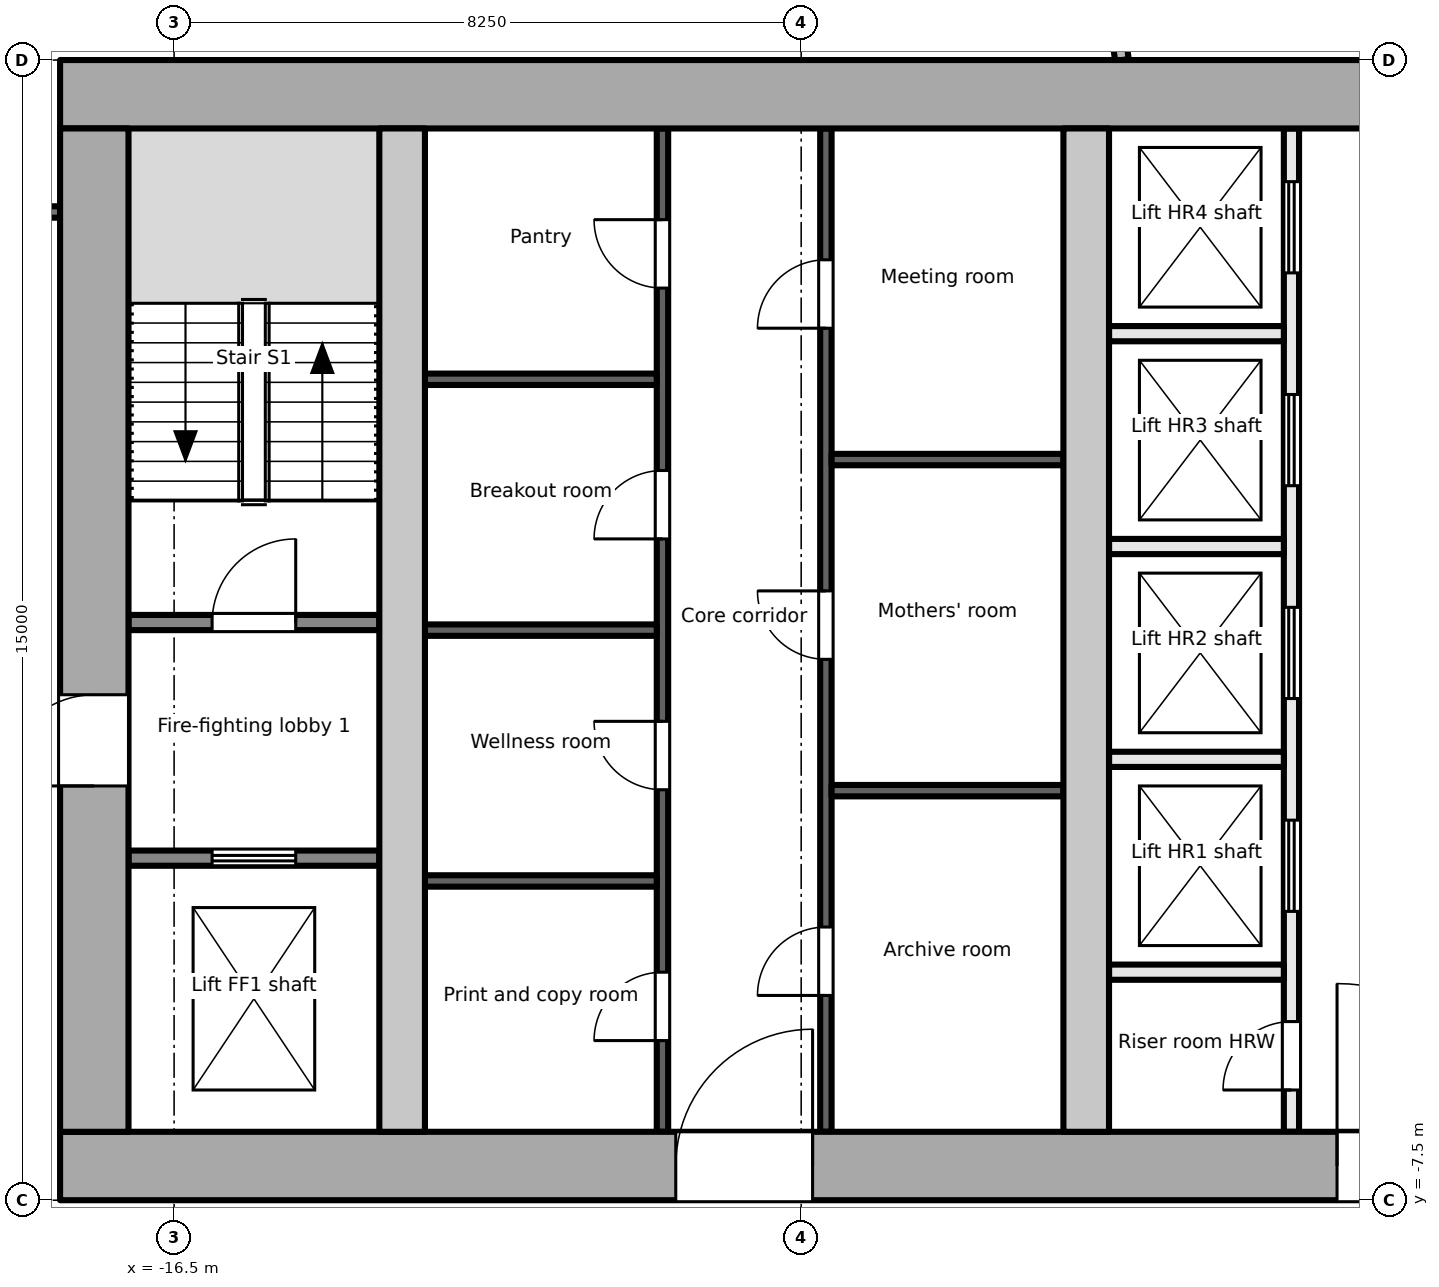
"""IFC4 building model, lengths in metres.
Left out: names, types, materials, properties, quantities, classifications, styles, units other than length and angle.
Written with IfcOpenShell. Run it as: python <this file> out.ifc"""

import sys

from ifc_helpers import new_model, si_unit, direction, frame, frame_2d, origin, place, context, subcontext, project, spatial, rectangle, extrude, element, fill, save


model = new_model("IFC4")
c1 = context("Model", 3, precision=1e-05, world=origin(), true_north=direction((0.0, 1.0)))
c2 = subcontext(c1, "Body", "Model", "MODEL_VIEW")
j1 = project(units=[si_unit("LENGTHUNIT", "METRE"), si_unit("PLANEANGLEUNIT", "RADIAN")], contexts=[c1])
p1 = place(None, origin())
s1 = spatial("IfcSite", under=j1, at=p1, CompositionType="ELEMENT")
p2 = place(p1, origin())
s2 = spatial("IfcBuilding", under=s1, at=p2, CompositionType="ELEMENT")
p3 = place(p2, frame((0.0, 0.0, 172.4)))
s3 = spatial("IfcBuildingStorey", under=s2, at=p3, CompositionType="ELEMENT", Elevation=172.4)
p4 = place(p3, frame((-18.0, -7.05, -0.2), z_axis=(0.0, 0.0, 1.0), x_axis=(1.0, 0.0, 0.0)))
e1 = element("IfcWall", 1, at=p4, inside=s3, PredefinedType="SHEAR", context=c2, shape_type="SweptSolid", body=[
    extrude(rectangle(XDim=36.0, YDim=0.9, at=frame_2d((18.0, 0.0))), origin(), (0.0, 0.0, 1.0), 3.9),
])
p5 = place(p4, frame((8.1, 0.0, 0.2)))
e2 = element("IfcOpeningElement", 2, at=p5, cuts=e1, PredefinedType="OPENING", context=c2, shape_type="SweptSolid", body=[
    extrude(rectangle(XDim=1.8, YDim=2.1, at=frame_2d((0.9, 1.05))), frame((0.0, 0.46, 0.0), z_axis=(0.0, -1.0, 0.0), x_axis=(1.0, 0.0, 0.0)), (0.0, 0.0, 1.0), 0.921),
])
p6 = place(p4, frame((16.8, 0.0, 0.2)))
e3 = element("IfcOpeningElement", 3, at=p6, cuts=e1, PredefinedType="OPENING", context=c2, shape_type="SweptSolid", body=[
    extrude(rectangle(XDim=2.4, YDim=2.1, at=frame_2d((1.2, 1.05))), frame((0.0, 0.46, 0.0), z_axis=(0.0, -1.0, 0.0), x_axis=(1.0, 0.0, 0.0)), (0.0, 0.0, 1.0), 0.921),
])
p7 = place(p4, frame((26.1, 0.0, 0.2)))
e4 = element("IfcOpeningElement", 4, at=p7, cuts=e1, PredefinedType="OPENING", context=c2, shape_type="SweptSolid", body=[
    extrude(rectangle(XDim=2.4, YDim=2.1, at=frame_2d((1.2, 1.05))), frame((0.0, 0.46, 0.0), z_axis=(0.0, -1.0, 0.0), x_axis=(1.0, 0.0, 0.0)), (0.0, 0.0, 1.0), 0.921),
])
p8 = place(p3, frame((-18.0, 7.05, -0.2), z_axis=(0.0, 0.0, 1.0), x_axis=(1.0, 0.0, 0.0)))
e5 = element("IfcWall", 5, at=p8, inside=s3, PredefinedType="SHEAR", context=c2, shape_type="SweptSolid", body=[
    extrude(rectangle(XDim=36.0, YDim=0.9, at=frame_2d((18.0, 0.0))), origin(), (0.0, 0.0, 1.0), 3.9),
])
p9 = place(p3, frame((-17.55, -6.6, -0.2), z_axis=(0.0, 0.0, 1.0), x_axis=(0.0, 1.0, 0.0)))
e6 = element("IfcWall", 6, at=p9, inside=s3, PredefinedType="SHEAR", context=c2, shape_type="SweptSolid", body=[
    extrude(rectangle(XDim=13.2, YDim=0.9, at=frame_2d((6.6, 0.0))), origin(), (0.0, 0.0, 1.0), 3.9),
])
p10 = place(p9, frame((4.55, 0.0, 0.2)))
e7 = element("IfcOpeningElement", 7, at=p10, cuts=e6, PredefinedType="OPENING", context=c2, shape_type="SweptSolid", body=[
    extrude(rectangle(XDim=1.2, YDim=2.1, at=frame_2d((0.6, 1.05))), frame((0.0, 0.46, 0.0), z_axis=(0.0, -1.0, 0.0), x_axis=(1.0, 0.0, 0.0)), (0.0, 0.0, 1.0), 0.921),
])
for number, where, z_axis, x_axis in (
    (8, (-13.5, -6.6, -0.2), (0.0, 0.0, 1.0), (0.0, 1.0, 0.0)),
    (9, (-4.5, -6.6, -0.2), (0.0, 0.0, 1.0), (0.0, 1.0, 0.0)),
):
    element("IfcWall", number, at=place(p3, frame(where, z_axis=z_axis, x_axis=x_axis)), inside=s3, PredefinedType="SHEAR", context=c2, shape_type="SweptSolid", body=[
        extrude(rectangle(XDim=13.2, YDim=0.6, at=frame_2d((6.6, 0.0))), origin(), (0.0, 0.0, 1.0), 3.9),
    ])
p11 = place(p3, frame((-17.1, -3.0, 0.0), z_axis=(0.0, 0.0, 1.0), x_axis=(1.0, 0.0, 0.0)))
e10 = element("IfcWall", 10, at=p11, inside=s3, PredefinedType="PARTITIONING", context=c2, shape_type="SweptSolid", body=[
    extrude(rectangle(XDim=3.3, YDim=0.2, at=frame_2d((1.65, 0.0))), origin(), (0.0, 0.0, 1.0), 3.7),
])
p12 = place(p11, frame((1.1, 0.0, 0.0)))
e11 = element("IfcOpeningElement", 11, at=p12, cuts=e10, PredefinedType="OPENING", context=c2, shape_type="SweptSolid", body=[
    extrude(rectangle(XDim=1.1, YDim=2.1, at=frame_2d((0.55, 1.05))), frame((0.0, 0.111, 0.0), z_axis=(0.0, -1.0, 0.0), x_axis=(1.0, 0.0, 0.0)), (0.0, 0.0, 1.0), 0.221),
])
p13 = place(p3, frame((-17.1, 0.1, 0.0), z_axis=(0.0, 0.0, 1.0), x_axis=(1.0, 0.0, 0.0)))
e12 = element("IfcWall", 12, at=p13, inside=s3, PredefinedType="PARTITIONING", context=c2, shape_type="SweptSolid", body=[
    extrude(rectangle(XDim=3.3, YDim=0.2, at=frame_2d((1.65, 0.0))), origin(), (0.0, 0.0, 1.0), 3.7),
])
p14 = place(p13, frame((1.1, 0.0, 0.0)))
e13 = element("IfcOpeningElement", 13, at=p14, cuts=e12, PredefinedType="OPENING", context=c2, shape_type="SweptSolid", body=[
    extrude(rectangle(XDim=1.1, YDim=2.1, at=frame_2d((0.55, 1.05))), frame((0.0, 0.111, 0.0), z_axis=(0.0, -1.0, 0.0), x_axis=(1.0, 0.0, 0.0)), (0.0, 0.0, 1.0), 0.221),
])
p15 = place(p3, frame((-10.075, -6.6, 0.0), z_axis=(0.0, 0.0, 1.0), x_axis=(0.0, 1.0, 0.0)))
e14 = element("IfcWall", 14, at=p15, inside=s3, PredefinedType="PARTITIONING", context=c2, shape_type="SweptSolid", body=[
    extrude(rectangle(XDim=13.2, YDim=0.15, at=frame_2d((6.6, 0.0))), origin(), (0.0, 0.0, 1.0), 3.7),
])
p16 = place(p15, frame((1.2, 0.0, 0.0)))
e15 = element("IfcOpeningElement", 15, at=p16, cuts=e14, PredefinedType="OPENING", context=c2, shape_type="SweptSolid", body=[
    extrude(rectangle(XDim=0.9, YDim=2.1, at=frame_2d((0.45, 1.05))), frame((0.0, 0.085, 0.0), z_axis=(0.0, -1.0, 0.0), x_axis=(1.0, 0.0, 0.0)), (0.0, 0.0, 1.0), 0.171),
])
p17 = place(p15, frame((4.5, 0.0, 0.0)))
e16 = element("IfcOpeningElement", 16, at=p17, cuts=e14, PredefinedType="OPENING", context=c2, shape_type="SweptSolid", body=[
    extrude(rectangle(XDim=0.9, YDim=2.1, at=frame_2d((0.45, 1.05))), frame((0.0, 0.085, 0.0), z_axis=(0.0, -1.0, 0.0), x_axis=(1.0, 0.0, 0.0)), (0.0, 0.0, 1.0), 0.171),
])
p18 = place(p15, frame((7.8, 0.0, 0.0)))
e17 = element("IfcOpeningElement", 17, at=p18, cuts=e14, PredefinedType="OPENING", context=c2, shape_type="SweptSolid", body=[
    extrude(rectangle(XDim=0.9, YDim=2.1, at=frame_2d((0.45, 1.05))), frame((0.0, 0.085, 0.0), z_axis=(0.0, -1.0, 0.0), x_axis=(1.0, 0.0, 0.0)), (0.0, 0.0, 1.0), 0.171),
])
p19 = place(p15, frame((11.1, 0.0, 0.0)))
e18 = element("IfcOpeningElement", 18, at=p19, cuts=e14, PredefinedType="OPENING", context=c2, shape_type="SweptSolid", body=[
    extrude(rectangle(XDim=0.9, YDim=2.1, at=frame_2d((0.45, 1.05))), frame((0.0, 0.085, 0.0), z_axis=(0.0, -1.0, 0.0), x_axis=(1.0, 0.0, 0.0)), (0.0, 0.0, 1.0), 0.171),
])
for number, where, z_axis, x_axis in (
    (19, (-13.2, -3.3, 0.0), (0.0, 0.0, 1.0), (1.0, 0.0, 0.0)),
    (20, (-13.2, 0.0, 0.0), (0.0, 0.0, 1.0), (1.0, 0.0, 0.0)),
    (21, (-13.2, 3.3, 0.0), (0.0, 0.0, 1.0), (1.0, 0.0, 0.0)),
):
    element("IfcWall", number, at=place(p3, frame(where, z_axis=z_axis, x_axis=x_axis)), inside=s3, PredefinedType="PARTITIONING", context=c2, shape_type="SweptSolid", body=[
        extrude(rectangle(XDim=3.05, YDim=0.15, at=frame_2d((1.525, 0.0))), origin(), (0.0, 0.0, 1.0), 3.7),
    ])
p20 = place(p3, frame((-7.925, -6.6, 0.0), z_axis=(0.0, 0.0, 1.0), x_axis=(0.0, 1.0, 0.0)))
e22 = element("IfcWall", 22, at=p20, inside=s3, PredefinedType="PARTITIONING", context=c2, shape_type="SweptSolid", body=[
    extrude(rectangle(XDim=13.2, YDim=0.15, at=frame_2d((6.6, 0.0))), origin(), (0.0, 0.0, 1.0), 3.7),
])
p21 = place(p20, frame((1.794, 0.0, 0.0)))
e23 = element("IfcOpeningElement", 23, at=p21, cuts=e22, PredefinedType="OPENING", context=c2, shape_type="SweptSolid", body=[
    extrude(rectangle(XDim=0.9, YDim=2.1, at=frame_2d((0.45, 1.05))), frame((0.0, 0.085, 0.0), z_axis=(0.0, -1.0, 0.0), x_axis=(1.0, 0.0, 0.0)), (0.0, 0.0, 1.0), 0.171),
])
p22 = place(p20, frame((6.216, 0.0, 0.0)))
e24 = element("IfcOpeningElement", 24, at=p22, cuts=e22, PredefinedType="OPENING", context=c2, shape_type="SweptSolid", body=[
    extrude(rectangle(XDim=0.9, YDim=2.1, at=frame_2d((0.45, 1.05))), frame((0.0, 0.085, 0.0), z_axis=(0.0, -1.0, 0.0), x_axis=(1.0, 0.0, 0.0)), (0.0, 0.0, 1.0), 0.171),
])
p23 = place(p20, frame((10.572, 0.0, 0.0)))
e25 = element("IfcOpeningElement", 25, at=p23, cuts=e22, PredefinedType="OPENING", context=c2, shape_type="SweptSolid", body=[
    extrude(rectangle(XDim=0.9, YDim=2.1, at=frame_2d((0.45, 1.05))), frame((0.0, 0.085, 0.0), z_axis=(0.0, -1.0, 0.0), x_axis=(1.0, 0.0, 0.0)), (0.0, 0.0, 1.0), 0.171),
])
for number, where, z_axis, x_axis in (
    (26, (-7.85, -2.112, 0.0), (0.0, 0.0, 1.0), (1.0, 0.0, 0.0)),
    (27, (-7.85, 2.244, 0.0), (0.0, 0.0, 1.0), (1.0, 0.0, 0.0)),
):
    element("IfcWall", number, at=place(p3, frame(where, z_axis=z_axis, x_axis=x_axis)), inside=s3, PredefinedType="PARTITIONING", context=c2, shape_type="SweptSolid", body=[
        extrude(rectangle(XDim=3.05, YDim=0.15, at=frame_2d((1.525, 0.0))), origin(), (0.0, 0.0, 1.0), 3.7),
    ])
p24 = place(p3, frame((-1.8, -6.6, 0.0), z_axis=(0.0, 0.0, 1.0), x_axis=(0.0, 1.0, 0.0)))
e28 = element("IfcWall", 28, at=p24, inside=s3, PredefinedType="PARTITIONING", context=c2, shape_type="SweptSolid", body=[
    extrude(rectangle(XDim=13.2, YDim=0.2, at=frame_2d((6.6, 0.0))), origin(), (0.0, 0.0, 1.0), 3.7),
])
p25 = place(p24, frame((0.55, 0.0, 0.0)))
e29 = element("IfcOpeningElement", 29, at=p25, cuts=e28, PredefinedType="OPENING", context=c2, shape_type="SweptSolid", body=[
    extrude(rectangle(XDim=0.9, YDim=2.1, at=frame_2d((0.45, 1.05))), frame((0.0, 0.111, 0.0), z_axis=(0.0, -1.0, 0.0), x_axis=(1.0, 0.0, 0.0)), (0.0, 0.0, 1.0), 0.221),
])
p26 = place(p24, frame((2.9, 0.0, 0.0)))
e30 = element("IfcOpeningElement", 30, at=p26, cuts=e28, PredefinedType="OPENING", context=c2, shape_type="SweptSolid", body=[
    extrude(rectangle(XDim=1.2, YDim=2.1, at=frame_2d((0.6, 1.05))), frame((0.0, 0.111, 0.0), z_axis=(0.0, -1.0, 0.0), x_axis=(1.0, 0.0, 0.0)), (0.0, 0.0, 1.0), 0.221),
])
p27 = place(p24, frame((5.7, 0.0, 0.0)))
e31 = element("IfcOpeningElement", 31, at=p27, cuts=e28, PredefinedType="OPENING", context=c2, shape_type="SweptSolid", body=[
    extrude(rectangle(XDim=1.2, YDim=2.1, at=frame_2d((0.6, 1.05))), frame((0.0, 0.111, 0.0), z_axis=(0.0, -1.0, 0.0), x_axis=(1.0, 0.0, 0.0)), (0.0, 0.0, 1.0), 0.221),
])
p28 = place(p24, frame((8.5, 0.0, 0.0)))
e32 = element("IfcOpeningElement", 32, at=p28, cuts=e28, PredefinedType="OPENING", context=c2, shape_type="SweptSolid", body=[
    extrude(rectangle(XDim=1.2, YDim=2.1, at=frame_2d((0.6, 1.05))), frame((0.0, 0.111, 0.0), z_axis=(0.0, -1.0, 0.0), x_axis=(1.0, 0.0, 0.0)), (0.0, 0.0, 1.0), 0.221),
])
p29 = place(p24, frame((11.3, 0.0, 0.0)))
e33 = element("IfcOpeningElement", 33, at=p29, cuts=e28, PredefinedType="OPENING", context=c2, shape_type="SweptSolid", body=[
    extrude(rectangle(XDim=1.2, YDim=2.1, at=frame_2d((0.6, 1.05))), frame((0.0, 0.111, 0.0), z_axis=(0.0, -1.0, 0.0), x_axis=(1.0, 0.0, 0.0)), (0.0, 0.0, 1.0), 0.221),
])
for number, where, z_axis, x_axis in (
    (34, (-4.2, -1.7, 0.0), (0.0, 0.0, 1.0), (1.0, 0.0, 0.0)),
    (35, (-4.2, 1.1, 0.0), (0.0, 0.0, 1.0), (1.0, 0.0, 0.0)),
    (36, (-4.2, 3.9, 0.0), (0.0, 0.0, 1.0), (1.0, 0.0, 0.0)),
    (37, (-4.2, -4.5, 0.0), (0.0, 0.0, 1.0), (1.0, 0.0, 0.0)),
):
    element("IfcWall", number, at=place(p3, frame(where, z_axis=z_axis, x_axis=x_axis)), inside=s3, PredefinedType="PARTITIONING", context=c2, shape_type="SweptSolid", body=[
        extrude(rectangle(XDim=2.3, YDim=0.2, at=frame_2d((1.15, 0.0))), origin(), (0.0, 0.0, 1.0), 3.7),
    ])
p30 = place(p3, frame((-20.325, 5.501, 0.0), z_axis=(0.0, 0.0, 1.0), x_axis=(1.0, 0.0, 0.0)))
e38 = element("IfcWall", 38, at=p30, inside=s3, PredefinedType="PARTITIONING", context=c2, shape_type="SweptSolid", body=[
    extrude(rectangle(XDim=2.325, YDim=0.15, at=frame_2d((1.163, 0.0))), origin(), (0.0, 0.0, 1.0), 3.7),
])
p31 = place(p3, frame((-4.437, 10.393, 0.0), z_axis=(0.0, 0.0, 1.0), x_axis=(0.139303486007, -0.990249735565, 0.0)))
e39 = element("IfcWall", 39, at=p31, inside=s3, PredefinedType="PARTITIONING", context=c2, shape_type="SweptSolid", body=[
    extrude(rectangle(XDim=2.922, YDim=0.18, at=frame_2d((1.461, 0.0))), origin(), (0.0, 0.0, 1.0), 3.25),
])
p32 = place(p12, origin())
e40 = element("IfcDoor", 40, at=p32, inside=s3, OperationType="DOUBLE_DOOR_SLIDING", PredefinedType="DOOR", context=c2, shape_type="SweptSolid", body=[
    extrude(rectangle(XDim=1.1, YDim=2.1, at=frame_2d((0.55, 1.05))), frame((0.0, 0.025, 0.0), z_axis=(0.0, -1.0, 0.0), x_axis=(1.0, 0.0, 0.0)), (0.0, 0.0, 1.0), 0.05),
])
fill(e11, e40)
p33 = place(p10, origin())
e41 = element("IfcDoor", 41, at=p33, inside=s3, OperationType="SINGLE_SWING_LEFT", PredefinedType="DOOR", context=c2, shape_type="SweptSolid", body=[
    extrude(rectangle(XDim=1.2, YDim=2.1, at=frame_2d((0.6, 1.05))), frame((0.0, 0.025, 0.0), z_axis=(0.0, -1.0, 0.0), x_axis=(1.0, 0.0, 0.0)), (0.0, 0.0, 1.0), 0.05),
])
fill(e7, e41)
p34 = place(p14, origin())
e42 = element("IfcDoor", 42, at=p34, inside=s3, OperationType="SINGLE_SWING_RIGHT", PredefinedType="DOOR", context=c2, shape_type="SweptSolid", body=[
    extrude(rectangle(XDim=1.1, YDim=2.1, at=frame_2d((0.55, 1.05))), frame((0.0, 0.025, 0.0), z_axis=(0.0, -1.0, 0.0), x_axis=(1.0, 0.0, 0.0)), (0.0, 0.0, 1.0), 0.05),
])
fill(e13, e42)
p35 = place(p16, origin())
e43 = element("IfcDoor", 43, at=p35, inside=s3, OperationType="SINGLE_SWING_LEFT", PredefinedType="DOOR", context=c2, shape_type="SweptSolid", body=[
    extrude(rectangle(XDim=0.9, YDim=2.1, at=frame_2d((0.45, 1.05))), frame((0.0, 0.025, 0.0), z_axis=(0.0, -1.0, 0.0), x_axis=(1.0, 0.0, 0.0)), (0.0, 0.0, 1.0), 0.05),
])
fill(e15, e43)
p36 = place(p17, origin())
e44 = element("IfcDoor", 44, at=p36, inside=s3, OperationType="SINGLE_SWING_RIGHT", PredefinedType="DOOR", context=c2, shape_type="SweptSolid", body=[
    extrude(rectangle(XDim=0.9, YDim=2.1, at=frame_2d((0.45, 1.05))), frame((0.0, 0.025, 0.0), z_axis=(0.0, -1.0, 0.0), x_axis=(1.0, 0.0, 0.0)), (0.0, 0.0, 1.0), 0.05),
])
fill(e16, e44)
p37 = place(p18, origin())
e45 = element("IfcDoor", 45, at=p37, inside=s3, OperationType="SINGLE_SWING_LEFT", PredefinedType="DOOR", context=c2, shape_type="SweptSolid", body=[
    extrude(rectangle(XDim=0.9, YDim=2.1, at=frame_2d((0.45, 1.05))), frame((0.0, 0.025, 0.0), z_axis=(0.0, -1.0, 0.0), x_axis=(1.0, 0.0, 0.0)), (0.0, 0.0, 1.0), 0.05),
])
fill(e17, e45)
p38 = place(p19, origin())
e46 = element("IfcDoor", 46, at=p38, inside=s3, OperationType="SINGLE_SWING_RIGHT", PredefinedType="DOOR", context=c2, shape_type="SweptSolid", body=[
    extrude(rectangle(XDim=0.9, YDim=2.1, at=frame_2d((0.45, 1.05))), frame((0.0, 0.025, 0.0), z_axis=(0.0, -1.0, 0.0), x_axis=(1.0, 0.0, 0.0)), (0.0, 0.0, 1.0), 0.05),
])
fill(e18, e46)
p39 = place(p21, origin())
e47 = element("IfcDoor", 47, at=p39, inside=s3, OperationType="SINGLE_SWING_LEFT", PredefinedType="DOOR", context=c2, shape_type="SweptSolid", body=[
    extrude(rectangle(XDim=0.9, YDim=2.1, at=frame_2d((0.45, 1.05))), frame((0.0, 0.025, 0.0), z_axis=(0.0, -1.0, 0.0), x_axis=(1.0, 0.0, 0.0)), (0.0, 0.0, 1.0), 0.05),
])
fill(e23, e47)
p40 = place(p22, origin())
e48 = element("IfcDoor", 48, at=p40, inside=s3, OperationType="SINGLE_SWING_RIGHT", PredefinedType="DOOR", context=c2, shape_type="SweptSolid", body=[
    extrude(rectangle(XDim=0.9, YDim=2.1, at=frame_2d((0.45, 1.05))), frame((0.0, 0.025, 0.0), z_axis=(0.0, -1.0, 0.0), x_axis=(1.0, 0.0, 0.0)), (0.0, 0.0, 1.0), 0.05),
])
fill(e24, e48)
p41 = place(p23, origin())
e49 = element("IfcDoor", 49, at=p41, inside=s3, OperationType="SINGLE_SWING_LEFT", PredefinedType="DOOR", context=c2, shape_type="SweptSolid", body=[
    extrude(rectangle(XDim=0.9, YDim=2.1, at=frame_2d((0.45, 1.05))), frame((0.0, 0.025, 0.0), z_axis=(0.0, -1.0, 0.0), x_axis=(1.0, 0.0, 0.0)), (0.0, 0.0, 1.0), 0.05),
])
fill(e25, e49)
p42 = place(p5, origin())
e50 = element("IfcDoor", 50, at=p42, inside=s3, OperationType="SINGLE_SWING_RIGHT", PredefinedType="DOOR", context=c2, shape_type="SweptSolid", body=[
    extrude(rectangle(XDim=1.8, YDim=2.1, at=frame_2d((0.9, 1.05))), frame((0.0, 0.025, 0.0), z_axis=(0.0, -1.0, 0.0), x_axis=(1.0, 0.0, 0.0)), (0.0, 0.0, 1.0), 0.05),
])
fill(e2, e50)
p43 = place(p25, origin())
e51 = element("IfcDoor", 51, at=p43, inside=s3, OperationType="SINGLE_SWING_LEFT", PredefinedType="DOOR", context=c2, shape_type="SweptSolid", body=[
    extrude(rectangle(XDim=0.9, YDim=2.1, at=frame_2d((0.45, 1.05))), frame((0.0, 0.025, 0.0), z_axis=(0.0, -1.0, 0.0), x_axis=(1.0, 0.0, 0.0)), (0.0, 0.0, 1.0), 0.05),
])
fill(e29, e51)
p44 = place(p26, origin())
e52 = element("IfcDoor", 52, at=p44, inside=s3, OperationType="DOUBLE_DOOR_SLIDING", PredefinedType="DOOR", context=c2, shape_type="SweptSolid", body=[
    extrude(rectangle(XDim=1.2, YDim=2.1, at=frame_2d((0.6, 1.05))), frame((0.0, 0.025, 0.0), z_axis=(0.0, -1.0, 0.0), x_axis=(1.0, 0.0, 0.0)), (0.0, 0.0, 1.0), 0.05),
])
fill(e30, e52)
p45 = place(p27, origin())
e53 = element("IfcDoor", 53, at=p45, inside=s3, OperationType="DOUBLE_DOOR_SLIDING", PredefinedType="DOOR", context=c2, shape_type="SweptSolid", body=[
    extrude(rectangle(XDim=1.2, YDim=2.1, at=frame_2d((0.6, 1.05))), frame((0.0, 0.025, 0.0), z_axis=(0.0, -1.0, 0.0), x_axis=(1.0, 0.0, 0.0)), (0.0, 0.0, 1.0), 0.05),
])
fill(e31, e53)
p46 = place(p28, origin())
e54 = element("IfcDoor", 54, at=p46, inside=s3, OperationType="DOUBLE_DOOR_SLIDING", PredefinedType="DOOR", context=c2, shape_type="SweptSolid", body=[
    extrude(rectangle(XDim=1.2, YDim=2.1, at=frame_2d((0.6, 1.05))), frame((0.0, 0.025, 0.0), z_axis=(0.0, -1.0, 0.0), x_axis=(1.0, 0.0, 0.0)), (0.0, 0.0, 1.0), 0.05),
])
fill(e32, e54)
p47 = place(p29, origin())
e55 = element("IfcDoor", 55, at=p47, inside=s3, OperationType="DOUBLE_DOOR_SLIDING", PredefinedType="DOOR", context=c2, shape_type="SweptSolid", body=[
    extrude(rectangle(XDim=1.2, YDim=2.1, at=frame_2d((0.6, 1.05))), frame((0.0, 0.025, 0.0), z_axis=(0.0, -1.0, 0.0), x_axis=(1.0, 0.0, 0.0)), (0.0, 0.0, 1.0), 0.05),
])
fill(e33, e55)
p48 = place(p6, origin())
e56 = element("IfcDoor", 56, at=p48, inside=s3, OperationType="DOUBLE_DOOR_DOUBLE_SWING", PredefinedType="DOOR", context=c2, shape_type="SweptSolid", body=[
    extrude(rectangle(XDim=2.4, YDim=2.1, at=frame_2d((1.2, 1.05))), frame((0.0, 0.025, 0.0), z_axis=(0.0, -1.0, 0.0), x_axis=(1.0, 0.0, 0.0)), (0.0, 0.0, 1.0), 0.05),
])
fill(e3, e56)
save(model, sys.argv[1])
